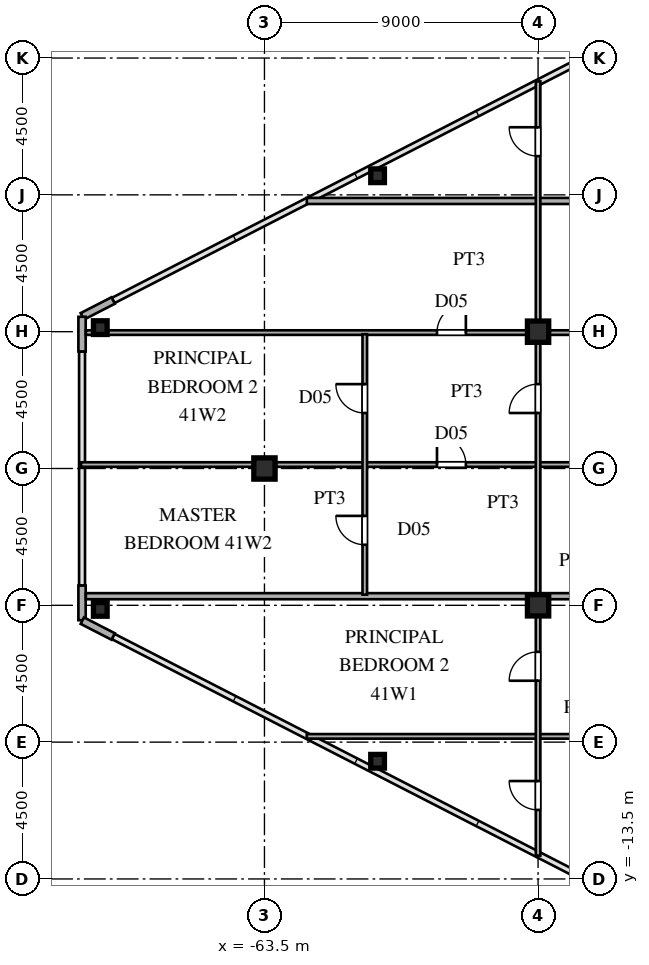
"""IFC4 building model, lengths in metres.
Left out: names, types, materials, properties, quantities, classifications, styles, units other than length and angle.
Written with IfcOpenShell. Run it as: python <this file> out.ifc"""

import sys

from ifc_helpers import new_model, si_unit, direction, frame, frame_2d, origin, origin_2d, place, context, subcontext, project, spatial, rectangle, hollow_rectangle, i_section, extrude, source, transform, mapped, element, fill, save


model = new_model("IFC4")
c1 = context("Model", 3, precision=1e-05, world=origin(), true_north=direction((0.0, 1.0)))
c2 = subcontext(c1, "Body", "Model", "MODEL_VIEW")
j1 = project(units=[si_unit("LENGTHUNIT", "METRE"), si_unit("PLANEANGLEUNIT", "RADIAN")], contexts=[c1])
p1 = place(None, origin())
s1 = spatial("IfcSite", under=j1, at=p1, CompositionType="ELEMENT")
p2 = place(p1, origin())
s2 = spatial("IfcBuilding", under=s1, at=p2, CompositionType="ELEMENT")
p3 = place(p2, frame((0.0, 0.0, 154.8)))
s3 = spatial("IfcBuildingStorey", under=s2, at=p3, CompositionType="ELEMENT", Elevation=154.8)
m1 = source(origin(), c2, "Body", "SweptSolid", [
    extrude(i_section(OverallWidth=0.7, OverallDepth=0.7, WebThickness=0.028, FlangeThickness=0.045, at=origin_2d()), origin(), (0.0, 0.0, 1.0), 3.6),
])
for number, where, z_axis, x_axis in (
    (1, (-54.5, -4.5, 0.0), (0.0, 0.0, 1.0), (1.0, 0.0, 0.0)),
    (2, (-54.5, 4.5, 0.0), (0.0, 0.0, 1.0), (1.0, 0.0, 0.0)),
    (3, (-63.5, 0.0, 0.0), (0.0, 0.0, 1.0), (1.0, 0.0, 0.0)),
):
    element("IfcColumn", number, at=place(p3, frame(where, z_axis=z_axis, x_axis=x_axis)), inside=s3, PredefinedType="COLUMN", context=c2, shape_type="MappedRepresentation", body=[
        mapped(m1, transform((0.0, 0.0, 0.0), scale=1.0)),
    ])
m2 = source(origin(), c2, "Body", "SweptSolid", [
    extrude(hollow_rectangle(XDim=0.45, YDim=0.45, WallThickness=0.018, at=origin_2d()), origin(), (0.0, 0.0, 1.0), 3.6),
])
for number, where, z_axis, x_axis in (
    (4, (-68.9, 4.634, 0.0), (0.0, 0.0, 1.0), (1.0, 0.0, 0.0)),
    (5, (-68.9, -4.634, 0.0), (0.0, 0.0, 1.0), (1.0, 0.0, 0.0)),
    (6, (-59.779, -9.629, 0.0), (0.0, 0.0, 1.0), (1.0, 0.0, 0.0)),
    (7, (-59.779, 9.629, 0.0), (0.0, 0.0, 1.0), (1.0, 0.0, 0.0)),
):
    element("IfcColumn", number, at=place(p3, frame(where, z_axis=z_axis, x_axis=x_axis)), inside=s3, PredefinedType="COLUMN", context=c2, shape_type="MappedRepresentation", body=[
        mapped(m2, transform((0.0, 0.0, 0.0), scale=1.0)),
    ])
p4 = place(p3, frame((-68.477, 5.525, 0.0), z_axis=(0.0, 0.0, 1.0), x_axis=(-0.889797395748, -0.456355776255, 0.0)))
e8 = element("IfcWall", 8, at=p4, inside=s3, PredefinedType="SOLIDWALL", context=c2, shape_type="SweptSolid", body=[
    extrude(rectangle(XDim=1.14, YDim=0.24, at=frame_2d((0.57, 0.0))), origin(), (0.0, 0.0, 1.0), 3.38),
])
for number, where, z_axis, x_axis in (
    (9, (-69.5, 4.99, 0.0), (0.0, 0.0, 1.0), (0.0, -1.0, 0.0)),
    (10, (-69.5, -3.85, 0.0), (0.0, 0.0, 1.0), (0.0, -1.0, 0.0)),
):
    element("IfcWall", number, at=place(p3, frame(where, z_axis=z_axis, x_axis=x_axis)), inside=s3, PredefinedType="SOLIDWALL", context=c2, shape_type="SweptSolid", body=[
        extrude(rectangle(XDim=1.14, YDim=0.24, at=frame_2d((0.57, 0.0))), origin(), (0.0, 0.0, 1.0), 3.38),
    ])
p5 = place(p3, frame((-69.491, -5.005, 0.0), z_axis=(0.0, 0.0, 1.0), x_axis=(0.889797395748, -0.456355776255, 0.0)))
e11 = element("IfcWall", 11, at=p5, inside=s3, PredefinedType="SOLIDWALL", context=c2, shape_type="SweptSolid", body=[
    extrude(rectangle(XDim=1.14, YDim=0.24, at=frame_2d((0.57, 0.0))), origin(), (0.0, 0.0, 1.0), 3.38),
])
p6 = place(p3, frame((-62.108, -8.81, 0.0), z_axis=(0.0, 0.0, 1.0), x_axis=(1.0, 0.0, 0.0)))
e12 = element("IfcWall", 12, at=p6, inside=s3, PredefinedType="PARTITIONING", context=c2, shape_type="SweptSolid", body=[
    extrude(rectangle(XDim=17.958, YDim=0.15, at=frame_2d((8.979, 0.0))), origin(), (0.0, 0.0, 1.0), 3.38),
])
p7 = place(p6, frame((12.333, 0.0, 0.0)))
e13 = element("IfcOpeningElement", 13, at=p7, cuts=e12, PredefinedType="OPENING", context=c2, shape_type="SweptSolid", body=[
    extrude(rectangle(XDim=0.95, YDim=2.15, at=frame_2d((0.475, 1.075))), frame((0.0, 0.085, 0.0), z_axis=(0.0, -1.0, 0.0), x_axis=(1.0, 0.0, 0.0)), (0.0, 0.0, 1.0), 0.17),
])
p8 = place(p3, frame((-69.375, -4.2, 0.0), z_axis=(0.0, 0.0, 1.0), x_axis=(1.0, 0.0, 0.0)))
e14 = element("IfcWall", 14, at=p8, inside=s3, PredefinedType="PARTITIONING", context=c2, shape_type="SweptSolid", body=[
    extrude(rectangle(XDim=29.895, YDim=0.2, at=frame_2d((14.948, 0.0))), origin(), (0.0, 0.0, 1.0), 3.38),
])
p9 = place(p3, frame((-69.535, 0.13, 0.0), z_axis=(0.0, 0.0, 1.0), x_axis=(1.0, 0.0, 0.0)))
e15 = element("IfcWall", 15, at=p9, inside=s3, PredefinedType="PARTITIONING", context=c2, shape_type="SweptSolid", body=[
    extrude(rectangle(XDim=25.385, YDim=0.15, at=frame_2d((12.692, 0.0))), origin(), (0.0, 0.0, 1.0), 3.38),
])
p10 = place(p9, frame((19.76, 0.0, 0.0)))
e16 = element("IfcOpeningElement", 16, at=p10, cuts=e15, PredefinedType="OPENING", context=c2, shape_type="SweptSolid", body=[
    extrude(rectangle(XDim=0.95, YDim=2.15, at=frame_2d((0.475, 1.075))), frame((0.0, 0.085, 0.0), z_axis=(0.0, -1.0, 0.0), x_axis=(1.0, 0.0, 0.0)), (0.0, 0.0, 1.0), 0.17),
])
p11 = place(p9, frame((11.71, 0.0, 0.0)))
e17 = element("IfcOpeningElement", 17, at=p11, cuts=e15, PredefinedType="OPENING", context=c2, shape_type="SweptSolid", body=[
    extrude(rectangle(XDim=0.95, YDim=2.15, at=frame_2d((0.475, 1.075))), frame((0.0, 0.085, 0.0), z_axis=(0.0, -1.0, 0.0), x_axis=(1.0, 0.0, 0.0)), (0.0, 0.0, 1.0), 0.17),
])
p12 = place(p3, frame((-69.375, 4.47, 0.0), z_axis=(0.0, 0.0, 1.0), x_axis=(1.0, 0.0, 0.0)))
e18 = element("IfcWall", 18, at=p12, inside=s3, PredefinedType="PARTITIONING", context=c2, shape_type="SweptSolid", body=[
    extrude(rectangle(XDim=25.225, YDim=0.15, at=frame_2d((12.613, 0.0))), origin(), (0.0, 0.0, 1.0), 2.78),
])
p13 = place(p12, frame((19.6, 0.0, 0.0)))
e19 = element("IfcOpeningElement", 19, at=p13, cuts=e18, PredefinedType="OPENING", context=c2, shape_type="SweptSolid", body=[
    extrude(rectangle(XDim=0.95, YDim=2.15, at=frame_2d((0.475, 1.075))), frame((0.0, 0.085, 0.0), z_axis=(0.0, -1.0, 0.0), x_axis=(1.0, 0.0, 0.0)), (0.0, 0.0, 1.0), 0.17),
])
p14 = place(p12, frame((11.55, 0.0, 0.0)))
e20 = element("IfcOpeningElement", 20, at=p14, cuts=e18, PredefinedType="OPENING", context=c2, shape_type="SweptSolid", body=[
    extrude(rectangle(XDim=0.95, YDim=2.15, at=frame_2d((0.475, 1.075))), frame((0.0, 0.085, 0.0), z_axis=(0.0, -1.0, 0.0), x_axis=(1.0, 0.0, 0.0)), (0.0, 0.0, 1.0), 0.17),
])
p15 = place(p3, frame((-62.106, 8.8, 0.0), z_axis=(0.0, 0.0, 1.0), x_axis=(1.0, 0.0, 0.0)))
e21 = element("IfcWall", 21, at=p15, inside=s3, PredefinedType="PARTITIONING", context=c2, shape_type="SweptSolid", body=[
    extrude(rectangle(XDim=22.626, YDim=0.2, at=frame_2d((11.313, 0.0))), origin(), (0.0, 0.0, 1.0), 3.38),
])
p16 = place(p3, frame((-60.2, -4.15, 0.0), z_axis=(0.0, 0.0, 1.0), x_axis=(0.0, 1.0, 0.0)))
e22 = element("IfcWall", 22, at=p16, inside=s3, PredefinedType="PARTITIONING", context=c2, shape_type="SweptSolid", body=[
    extrude(rectangle(XDim=8.567, YDim=0.15, at=frame_2d((4.283, 0.0))), origin(), (0.0, 0.0, 1.0), 3.38),
])
p17 = place(p16, frame((1.642, 0.0, 0.0)))
e23 = element("IfcOpeningElement", 23, at=p17, cuts=e22, PredefinedType="OPENING", context=c2, shape_type="SweptSolid", body=[
    extrude(rectangle(XDim=0.95, YDim=2.15, at=frame_2d((0.475, 1.075))), frame((0.0, 0.085, 0.0), z_axis=(0.0, -1.0, 0.0), x_axis=(1.0, 0.0, 0.0)), (0.0, 0.0, 1.0), 0.17),
])
p18 = place(p16, frame((5.975, 0.0, 0.0)))
e24 = element("IfcOpeningElement", 24, at=p18, cuts=e22, PredefinedType="OPENING", context=c2, shape_type="SweptSolid", body=[
    extrude(rectangle(XDim=0.95, YDim=2.15, at=frame_2d((0.475, 1.075))), frame((0.0, 0.085, 0.0), z_axis=(0.0, -1.0, 0.0), x_axis=(1.0, 0.0, 0.0)), (0.0, 0.0, 1.0), 0.17),
])
p19 = place(p3, frame((-54.5, -12.732, 0.0), z_axis=(0.0, 0.0, 1.0), x_axis=(0.0, 1.0, 0.0)))
e25 = element("IfcWall", 25, at=p19, inside=s3, PredefinedType="PARTITIONING", context=c2, shape_type="SweptSolid", body=[
    extrude(rectangle(XDim=25.464, YDim=0.15, at=frame_2d((12.732, 0.0))), origin(), (0.0, 0.0, 1.0), 2.78),
])
p20 = place(p19, frame((5.751, 0.0, 0.0)))
e26 = element("IfcOpeningElement", 26, at=p20, cuts=e25, PredefinedType="OPENING", context=c2, shape_type="SweptSolid", body=[
    extrude(rectangle(XDim=0.95, YDim=2.15, at=frame_2d((0.475, 1.075))), frame((0.0, 0.085, 0.0), z_axis=(0.0, -1.0, 0.0), x_axis=(1.0, 0.0, 0.0)), (0.0, 0.0, 1.0), 0.17),
])
p21 = place(p19, frame((1.503, 0.0, 0.0)))
e27 = element("IfcOpeningElement", 27, at=p21, cuts=e25, PredefinedType="OPENING", context=c2, shape_type="SweptSolid", body=[
    extrude(rectangle(XDim=0.95, YDim=2.15, at=frame_2d((0.475, 1.075))), frame((0.0, 0.085, 0.0), z_axis=(0.0, -1.0, 0.0), x_axis=(1.0, 0.0, 0.0)), (0.0, 0.0, 1.0), 0.17),
])
p22 = place(p19, frame((14.557, 0.0, 0.0)))
e28 = element("IfcOpeningElement", 28, at=p22, cuts=e25, PredefinedType="OPENING", context=c2, shape_type="SweptSolid", body=[
    extrude(rectangle(XDim=0.95, YDim=2.15, at=frame_2d((0.475, 1.075))), frame((0.0, 0.085, 0.0), z_axis=(0.0, -1.0, 0.0), x_axis=(1.0, 0.0, 0.0)), (0.0, 0.0, 1.0), 0.17),
])
p23 = place(p19, frame((23.006, 0.0, 0.0)))
e29 = element("IfcOpeningElement", 29, at=p23, cuts=e25, PredefinedType="OPENING", context=c2, shape_type="SweptSolid", body=[
    extrude(rectangle(XDim=0.95, YDim=2.15, at=frame_2d((0.475, 1.075))), frame((0.0, 0.085, 0.0), z_axis=(0.0, -1.0, 0.0), x_axis=(1.0, 0.0, 0.0)), (0.0, 0.0, 1.0), 0.17),
])
m3 = source(origin(), c2, "Body", "SweptSolid", [
    extrude(rectangle(XDim=0.95, YDim=2.15, at=frame_2d((0.475, 1.075))), frame((0.0, 0.025, 0.0), z_axis=(0.0, -1.0, 0.0), x_axis=(1.0, 0.0, 0.0)), (0.0, 0.0, 1.0), 0.05),
])
p24 = place(p11, origin())
e30 = element("IfcDoor", 30, at=p24, inside=s3, OperationType="SINGLE_SWING_LEFT", PredefinedType="DOOR", context=c2, shape_type="MappedRepresentation", body=[
    mapped(m3, transform((0.0, 0.0, 0.0), scale=1.0)),
])
fill(e17, e30)
p25 = place(p14, origin())
e31 = element("IfcDoor", 31, at=p25, inside=s3, OperationType="SINGLE_SWING_RIGHT", PredefinedType="DOOR", context=c2, shape_type="MappedRepresentation", body=[
    mapped(m3, transform((0.0, 0.0, 0.0), scale=1.0)),
])
fill(e20, e31)
p26 = place(p17, origin())
e32 = element("IfcDoor", 32, at=p26, inside=s3, OperationType="SINGLE_SWING_RIGHT", PredefinedType="DOOR", context=c2, shape_type="MappedRepresentation", body=[
    mapped(m3, transform((0.0, 0.0, 0.0), scale=1.0)),
])
fill(e23, e32)
p27 = place(p18, origin())
e33 = element("IfcDoor", 33, at=p27, inside=s3, OperationType="SINGLE_SWING_RIGHT", PredefinedType="DOOR", context=c2, shape_type="MappedRepresentation", body=[
    mapped(m3, transform((0.0, 0.0, 0.0), scale=1.0)),
])
fill(e24, e33)
p28 = place(p20, origin())
e34 = element("IfcDoor", 34, at=p28, inside=s3, OperationType="SINGLE_SWING_LEFT", PredefinedType="DOOR", context=c2, shape_type="MappedRepresentation", body=[
    mapped(m3, transform((0.0, 0.0, 0.0), scale=1.0)),
])
fill(e26, e34)
p29 = place(p21, origin())
e35 = element("IfcDoor", 35, at=p29, inside=s3, OperationType="SINGLE_SWING_RIGHT", PredefinedType="DOOR", context=c2, shape_type="MappedRepresentation", body=[
    mapped(m3, transform((0.0, 0.0, 0.0), scale=1.0)),
])
fill(e27, e35)
p30 = place(p22, origin())
e36 = element("IfcDoor", 36, at=p30, inside=s3, OperationType="SINGLE_SWING_LEFT", PredefinedType="DOOR", context=c2, shape_type="MappedRepresentation", body=[
    mapped(m3, transform((0.0, 0.0, 0.0), scale=1.0)),
])
fill(e28, e36)
p31 = place(p23, origin())
e37 = element("IfcDoor", 37, at=p31, inside=s3, OperationType="SINGLE_SWING_RIGHT", PredefinedType="DOOR", context=c2, shape_type="MappedRepresentation", body=[
    mapped(m3, transform((0.0, 0.0, 0.0), scale=1.0)),
])
fill(e29, e37)
save(model, sys.argv[1])
